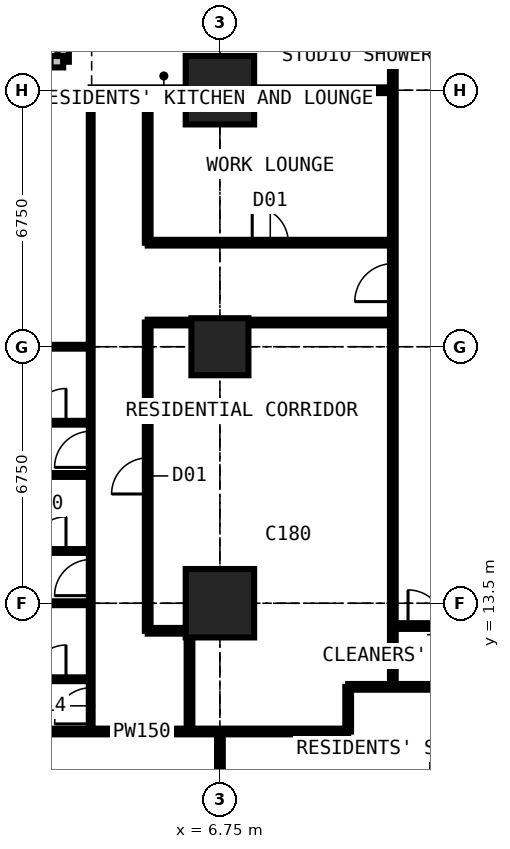
"""IFC4 building model, lengths in metres.
Left out: names, types, materials, properties, quantities, classifications, styles, units other than length and angle.
Written with IfcOpenShell. Run it as: python <this file> out.ifc"""

import sys

from ifc_helpers import new_model, si_unit, direction, frame, frame_2d, origin, origin_2d, place, context, subcontext, project, spatial, rectangle, extrude, element, fill, save


model = new_model("IFC4")
c1 = context("Model", 3, precision=1e-05, world=origin(), true_north=direction((0.0, 1.0)))
c2 = subcontext(c1, "Body", "Model", "MODEL_VIEW")
j1 = project(units=[si_unit("LENGTHUNIT", "METRE"), si_unit("PLANEANGLEUNIT", "RADIAN")], contexts=[c1])
p1 = place(None, origin())
s1 = spatial("IfcSite", under=j1, at=p1, CompositionType="ELEMENT")
p2 = place(p1, origin())
s2 = spatial("IfcBuilding", under=s1, at=p2, CompositionType="ELEMENT")
p3 = place(p2, frame((0.0, 0.0, 145.8)))
s3 = spatial("IfcBuildingStorey", under=s2, at=p3, CompositionType="ELEMENT", Elevation=145.8)
p4 = place(p3, frame((6.75, 13.5, 0.0), z_axis=(0.0, 0.0, 1.0), x_axis=(1.0, 0.0, 0.0)))
e1 = element("IfcColumn", 1, at=p4, inside=s3, PredefinedType="COLUMN", context=c2, shape_type="SweptSolid", body=[
    extrude(rectangle(XDim=1.8, YDim=1.8, at=origin_2d()), origin(), (0.0, 0.0, 1.0), 3.6),
])
p5 = place(p3, frame((6.75, 20.25, 0.0), z_axis=(0.0, 0.0, 1.0), x_axis=(1.0, 0.0, 0.0)))
e2 = element("IfcColumn", 2, at=p5, inside=s3, PredefinedType="COLUMN", context=c2, shape_type="SweptSolid", body=[
    extrude(rectangle(XDim=1.5, YDim=1.5, at=origin_2d()), origin(), (0.0, 0.0, 1.0), 3.6),
])
p6 = place(p3, frame((6.75, 27.0, 0.0), z_axis=(0.0, 0.0, 1.0), x_axis=(1.0, 0.0, 0.0)))
e3 = element("IfcColumn", 3, at=p6, inside=s3, PredefinedType="COLUMN", context=c2, shape_type="SweptSolid", body=[
    extrude(rectangle(XDim=1.8, YDim=1.8, at=origin_2d()), origin(), (0.0, 0.0, 1.0), 3.6),
])
p7 = place(p3, frame((2.625, 31.125, 0.0), z_axis=(0.0, 0.0, 1.0), x_axis=(0.0, -1.0, 0.0)))
e4 = element("IfcWall", 4, at=p7, inside=s3, PredefinedType="SOLIDWALL", context=c2, shape_type="SweptSolid", body=[
    extrude(rectangle(XDim=3.375, YDim=0.3, at=frame_2d((1.688, 0.0))), origin(), (0.0, 0.0, 1.0), 3.375),
])
p8 = place(p7, frame((0.788, 0.0, 0.6)))
e5 = element("IfcOpeningElement", 5, at=p8, cuts=e4, PredefinedType="OPENING", context=c2, shape_type="SweptSolid", body=[
    extrude(rectangle(XDim=1.8, YDim=2.1, at=frame_2d((0.9, 1.05))), frame((0.0, 0.16, 0.0), z_axis=(0.0, -1.0, 0.0), x_axis=(1.0, 0.0, 0.0)), (0.0, 0.0, 1.0), 0.32),
])
p9 = place(p3, frame((2.625, 27.75, 0.0), z_axis=(0.0, 0.0, 1.0), x_axis=(-1.0, 0.0, 0.0)))
e6 = element("IfcWall", 6, at=p9, inside=s3, PredefinedType="SOLIDWALL", context=c2, shape_type="SweptSolid", body=[
    extrude(rectangle(XDim=3.375, YDim=0.3, at=frame_2d((1.688, 0.0))), origin(), (0.0, 0.0, 1.0), 3.375),
])
p10 = place(p9, frame((0.292, 0.0, 0.9)))
e7 = element("IfcOpeningElement", 7, at=p10, cuts=e6, PredefinedType="OPENING", context=c2, shape_type="SweptSolid", body=[
    extrude(rectangle(XDim=1.2, YDim=1.8, at=frame_2d((0.6, 0.9))), frame((0.0, 0.16, 0.0), z_axis=(0.0, -1.0, 0.0), x_axis=(1.0, 0.0, 0.0)), (0.0, 0.0, 1.0), 0.32),
])
p11 = place(p3, frame((-0.734, 10.125, 0.0), z_axis=(0.0, 0.0, 1.0), x_axis=(1.0, 0.0, 0.0)))
e8 = element("IfcWall", 8, at=p11, inside=s3, PredefinedType="PARTITIONING", context=c2, shape_type="SweptSolid", body=[
    extrude(rectangle(XDim=10.859, YDim=0.15, at=frame_2d((5.429, 0.0))), origin(), (0.0, 0.0, 1.0), 3.375),
])
p12 = place(p3, frame((-0.734, 13.5, 0.0), z_axis=(0.0, 0.0, 1.0), x_axis=(1.0, 0.0, 0.0)))
e9 = element("IfcWall", 9, at=p12, inside=s3, PredefinedType="PARTITIONING", context=c2, shape_type="SweptSolid", body=[
    extrude(rectangle(XDim=4.084, YDim=0.1, at=frame_2d((2.042, 0.0))), origin(), (0.0, 0.0, 1.0), 2.61),
])
p13 = place(p3, frame((-0.734, 16.875, 0.0), z_axis=(0.0, 0.0, 1.0), x_axis=(1.0, 0.0, 0.0)))
e10 = element("IfcWall", 10, at=p13, inside=s3, PredefinedType="PARTITIONING", context=c2, shape_type="SweptSolid", body=[
    extrude(rectangle(XDim=4.084, YDim=0.1, at=frame_2d((2.042, 0.0))), origin(), (0.0, 0.0, 1.0), 3.375),
])
p14 = place(p3, frame((-0.734, 20.25, 0.0), z_axis=(0.0, 0.0, 1.0), x_axis=(1.0, 0.0, 0.0)))
e11 = element("IfcWall", 11, at=p14, inside=s3, PredefinedType="PARTITIONING", context=c2, shape_type="SweptSolid", body=[
    extrude(rectangle(XDim=4.084, YDim=0.1, at=frame_2d((2.042, 0.0))), origin(), (0.0, 0.0, 1.0), 2.61),
])
p15 = place(p3, frame((1.15, 11.5, 0.0), z_axis=(0.0, 0.0, 1.0), x_axis=(1.0, 0.0, 0.0)))
e12 = element("IfcWall", 12, at=p15, inside=s3, PredefinedType="PARTITIONING", context=c2, shape_type="SweptSolid", body=[
    extrude(rectangle(XDim=2.2, YDim=0.1, at=frame_2d((1.1, 0.0))), origin(), (0.0, 0.0, 1.0), 3.375),
])
p16 = place(p15, frame((0.65, 0.0, 0.0)))
e13 = element("IfcOpeningElement", 13, at=p16, cuts=e12, PredefinedType="OPENING", context=c2, shape_type="SweptSolid", body=[
    extrude(rectangle(XDim=0.9, YDim=2.2, at=frame_2d((0.45, 1.1))), frame((0.0, 0.06, 0.0), z_axis=(0.0, -1.0, 0.0), x_axis=(1.0, 0.0, 0.0)), (0.0, 0.0, 1.0), 0.12),
])
p17 = place(p3, frame((1.15, 14.875, 0.0), z_axis=(0.0, 0.0, 1.0), x_axis=(1.0, 0.0, 0.0)))
e14 = element("IfcWall", 14, at=p17, inside=s3, PredefinedType="PARTITIONING", context=c2, shape_type="SweptSolid", body=[
    extrude(rectangle(XDim=2.2, YDim=0.1, at=frame_2d((1.1, 0.0))), origin(), (0.0, 0.0, 1.0), 3.375),
])
p18 = place(p17, frame((0.65, 0.0, 0.0)))
e15 = element("IfcOpeningElement", 15, at=p18, cuts=e14, PredefinedType="OPENING", context=c2, shape_type="SweptSolid", body=[
    extrude(rectangle(XDim=0.9, YDim=2.2, at=frame_2d((0.45, 1.1))), frame((0.0, 0.06, 0.0), z_axis=(0.0, -1.0, 0.0), x_axis=(1.0, 0.0, 0.0)), (0.0, 0.0, 1.0), 0.12),
])
p19 = place(p3, frame((1.15, 18.25, 0.0), z_axis=(0.0, 0.0, 1.0), x_axis=(1.0, 0.0, 0.0)))
e16 = element("IfcWall", 16, at=p19, inside=s3, PredefinedType="PARTITIONING", context=c2, shape_type="SweptSolid", body=[
    extrude(rectangle(XDim=2.2, YDim=0.1, at=frame_2d((1.1, 0.0))), origin(), (0.0, 0.0, 1.0), 3.375),
])
p20 = place(p19, frame((0.65, 0.0, 0.0)))
e17 = element("IfcOpeningElement", 17, at=p20, cuts=e16, PredefinedType="OPENING", context=c2, shape_type="SweptSolid", body=[
    extrude(rectangle(XDim=0.9, YDim=2.2, at=frame_2d((0.45, 1.1))), frame((0.0, 0.06, 0.0), z_axis=(0.0, -1.0, 0.0), x_axis=(1.0, 0.0, 0.0)), (0.0, 0.0, 1.0), 0.12),
])
p21 = place(p3, frame((3.35, 10.125, 0.0), z_axis=(0.0, 0.0, 1.0), x_axis=(0.0, 1.0, 0.0)))
e18 = element("IfcWall", 18, at=p21, inside=s3, PredefinedType="PARTITIONING", context=c2, shape_type="SweptSolid", body=[
    extrude(rectangle(XDim=16.875, YDim=0.1, at=frame_2d((8.438, 0.0))), origin(), (0.0, 0.0, 1.0), 3.375),
])
p22 = place(p21, frame((0.2, 0.0, 0.0)))
e19 = element("IfcOpeningElement", 19, at=p22, cuts=e18, PredefinedType="OPENING", context=c2, shape_type="SweptSolid", body=[
    extrude(rectangle(XDim=0.95, YDim=2.2, at=frame_2d((0.475, 1.1))), frame((0.0, 0.06, 0.0), z_axis=(0.0, -1.0, 0.0), x_axis=(1.0, 0.0, 0.0)), (0.0, 0.0, 1.0), 0.12),
])
p23 = place(p21, frame((3.575, 0.0, 0.0)))
e20 = element("IfcOpeningElement", 20, at=p23, cuts=e18, PredefinedType="OPENING", context=c2, shape_type="SweptSolid", body=[
    extrude(rectangle(XDim=0.95, YDim=2.2, at=frame_2d((0.475, 1.1))), frame((0.0, 0.06, 0.0), z_axis=(0.0, -1.0, 0.0), x_axis=(1.0, 0.0, 0.0)), (0.0, 0.0, 1.0), 0.12),
])
p24 = place(p21, frame((6.95, 0.0, 0.0)))
e21 = element("IfcOpeningElement", 21, at=p24, cuts=e18, PredefinedType="OPENING", context=c2, shape_type="SweptSolid", body=[
    extrude(rectangle(XDim=0.95, YDim=2.2, at=frame_2d((0.475, 1.1))), frame((0.0, 0.06, 0.0), z_axis=(0.0, -1.0, 0.0), x_axis=(1.0, 0.0, 0.0)), (0.0, 0.0, 1.0), 0.12),
])
p25 = place(p3, frame((3.35, 27.0, 0.0), z_axis=(0.0, 0.0, 1.0), x_axis=(1.0, 0.0, 0.0)))
e22 = element("IfcWall", 22, at=p25, inside=s3, PredefinedType="PARTITIONING", context=c2, shape_type="SweptSolid", body=[
    extrude(rectangle(XDim=7.95, YDim=0.15, at=frame_2d((3.975, 0.0))), origin(), (0.0, 0.0, 1.0), 2.806),
])
p26 = place(p3, frame((4.85, 12.775, 0.0), z_axis=(0.0, 0.0, 1.0), x_axis=(0.0, 1.0, 0.0)))
e23 = element("IfcWall", 23, at=p26, inside=s3, PredefinedType="PARTITIONING", context=c2, shape_type="SweptSolid", body=[
    extrude(rectangle(XDim=8.113, YDim=0.15, at=frame_2d((4.056, 0.0))), origin(), (0.0, 0.0, 1.0), 3.375),
])
p27 = place(p26, frame((3.6, 0.0, 0.0)))
e24 = element("IfcOpeningElement", 24, at=p27, cuts=e23, PredefinedType="OPENING", context=c2, shape_type="SweptSolid", body=[
    extrude(rectangle(XDim=0.95, YDim=2.2, at=frame_2d((0.475, 1.1))), frame((0.0, 0.085, 0.0), z_axis=(0.0, -1.0, 0.0), x_axis=(1.0, 0.0, 0.0)), (0.0, 0.0, 1.0), 0.17),
])
p28 = place(p3, frame((4.85, 12.775, 0.0), z_axis=(0.0, 0.0, 1.0), x_axis=(1.0, 0.0, 0.0)))
e25 = element("IfcWall", 25, at=p28, inside=s3, PredefinedType="PARTITIONING", context=c2, shape_type="SweptSolid", body=[
    extrude(rectangle(XDim=1.1, YDim=0.15, at=frame_2d((0.55, 0.0))), origin(), (0.0, 0.0, 1.0), 3.375),
])
p29 = place(p3, frame((4.85, 20.887, 0.0), z_axis=(0.0, 0.0, 1.0), x_axis=(1.0, 0.0, 0.0)))
e26 = element("IfcWall", 26, at=p29, inside=s3, PredefinedType="PARTITIONING", context=c2, shape_type="SweptSolid", body=[
    extrude(rectangle(XDim=6.45, YDim=0.15, at=frame_2d((3.225, 0.0))), origin(), (0.0, 0.0, 1.0), 3.375),
])
p30 = place(p3, frame((4.85, 22.988, 0.0), z_axis=(0.0, 0.0, 1.0), x_axis=(0.0, 1.0, 0.0)))
e27 = element("IfcWall", 27, at=p30, inside=s3, PredefinedType="PARTITIONING", context=c2, shape_type="SweptSolid", body=[
    extrude(rectangle(XDim=4.012, YDim=0.15, at=frame_2d((2.006, 0.0))), origin(), (0.0, 0.0, 1.0), 3.375),
])
p31 = place(p3, frame((4.85, 22.988, 0.0), z_axis=(0.0, 0.0, 1.0), x_axis=(1.0, 0.0, 0.0)))
e28 = element("IfcWall", 28, at=p31, inside=s3, PredefinedType="PARTITIONING", context=c2, shape_type="SweptSolid", body=[
    extrude(rectangle(XDim=6.45, YDim=0.15, at=frame_2d((3.225, 0.0))), origin(), (0.0, 0.0, 1.0), 3.375),
])
p32 = place(p31, frame((2.75, 0.0, 0.0)))
e29 = element("IfcOpeningElement", 29, at=p32, cuts=e28, PredefinedType="OPENING", context=c2, shape_type="SweptSolid", body=[
    extrude(rectangle(XDim=0.95, YDim=2.2, at=frame_2d((0.475, 1.1))), frame((0.0, 0.085, 0.0), z_axis=(0.0, -1.0, 0.0), x_axis=(1.0, 0.0, 0.0)), (0.0, 0.0, 1.0), 0.17),
])
p33 = place(p3, frame((5.95, 10.125, 0.0), z_axis=(0.0, 0.0, 1.0), x_axis=(0.0, 1.0, 0.0)))
e30 = element("IfcWall", 30, at=p33, inside=s3, PredefinedType="PARTITIONING", context=c2, shape_type="SweptSolid", body=[
    extrude(rectangle(XDim=2.65, YDim=0.15, at=frame_2d((1.325, 0.0))), origin(), (0.0, 0.0, 1.0), 3.375),
])
p34 = place(p3, frame((6.75, 3.35, 0.0), z_axis=(0.0, 0.0, 1.0), x_axis=(0.0, 1.0, 0.0)))
e31 = element("IfcWall", 31, at=p34, inside=s3, PredefinedType="PARTITIONING", context=c2, shape_type="SweptSolid", body=[
    extrude(rectangle(XDim=6.775, YDim=0.15, at=frame_2d((3.387, 0.0))), origin(), (0.0, 0.0, 1.0), 2.877),
])
p35 = place(p3, frame((10.125, 10.125, 0.0), z_axis=(0.0, 0.0, 1.0), x_axis=(0.0, 1.0, 0.0)))
e32 = element("IfcWall", 32, at=p35, inside=s3, PredefinedType="PARTITIONING", context=c2, shape_type="SweptSolid", body=[
    extrude(rectangle(XDim=1.175, YDim=0.15, at=frame_2d((0.587, 0.0))), origin(), (0.0, 0.0, 1.0), 3.375),
])
p36 = place(p3, frame((10.125, 11.3, 0.0), z_axis=(0.0, 0.0, 1.0), x_axis=(1.0, 0.0, 0.0)))
e33 = element("IfcWall", 33, at=p36, inside=s3, PredefinedType="PARTITIONING", context=c2, shape_type="SweptSolid", body=[
    extrude(rectangle(XDim=20.25, YDim=0.15, at=frame_2d((10.125, 0.0))), origin(), (0.0, 0.0, 1.0), 3.375),
])
p37 = place(p36, frame((8.375, 0.0, 0.0)))
e34 = element("IfcOpeningElement", 34, at=p37, cuts=e33, PredefinedType="OPENING", context=c2, shape_type="SweptSolid", body=[
    extrude(rectangle(XDim=1.0, YDim=2.2, at=frame_2d((0.5, 1.1))), frame((0.0, 0.085, 0.0), z_axis=(0.0, -1.0, 0.0), x_axis=(1.0, 0.0, 0.0)), (0.0, 0.0, 1.0), 0.17),
])
p38 = place(p36, frame((10.975, 0.0, 0.0)))
e35 = element("IfcOpeningElement", 35, at=p38, cuts=e33, PredefinedType="OPENING", context=c2, shape_type="SweptSolid", body=[
    extrude(rectangle(XDim=1.0, YDim=2.2, at=frame_2d((0.5, 1.1))), frame((0.0, 0.085, 0.0), z_axis=(0.0, -1.0, 0.0), x_axis=(1.0, 0.0, 0.0)), (0.0, 0.0, 1.0), 0.17),
])
p39 = place(p36, frame((4.875, 0.0, 0.0)))
e36 = element("IfcOpeningElement", 36, at=p39, cuts=e33, PredefinedType="OPENING", context=c2, shape_type="SweptSolid", body=[
    extrude(rectangle(XDim=0.95, YDim=2.2, at=frame_2d((0.475, 1.1))), frame((0.0, 0.085, 0.0), z_axis=(0.0, -1.0, 0.0), x_axis=(1.0, 0.0, 0.0)), (0.0, 0.0, 1.0), 0.17),
])
p40 = place(p3, frame((11.3, 11.3, 0.0), z_axis=(0.0, 0.0, 1.0), x_axis=(0.0, 1.0, 0.0)))
e37 = element("IfcWall", 37, at=p40, inside=s3, PredefinedType="PARTITIONING", context=c2, shape_type="SweptSolid", body=[
    extrude(rectangle(XDim=19.3, YDim=0.15, at=frame_2d((9.65, 0.0))), origin(), (0.0, 0.0, 1.0), 3.375),
])
p41 = place(p40, frame((18.1, 0.0, 0.0)))
e38 = element("IfcOpeningElement", 38, at=p41, cuts=e37, PredefinedType="OPENING", context=c2, shape_type="SweptSolid", body=[
    extrude(rectangle(XDim=1.0, YDim=2.2, at=frame_2d((0.5, 1.1))), frame((0.0, 0.085, 0.0), z_axis=(0.0, -1.0, 0.0), x_axis=(1.0, 0.0, 0.0)), (0.0, 0.0, 1.0), 0.17),
])
p42 = place(p40, frame((10.137, 0.0, 0.0)))
e39 = element("IfcOpeningElement", 39, at=p42, cuts=e37, PredefinedType="OPENING", context=c2, shape_type="SweptSolid", body=[
    extrude(rectangle(XDim=1.0, YDim=2.2, at=frame_2d((0.5, 1.1))), frame((0.0, 0.085, 0.0), z_axis=(0.0, -1.0, 0.0), x_axis=(1.0, 0.0, 0.0)), (0.0, 0.0, 1.0), 0.17),
])
p43 = place(p3, frame((11.3, 12.9, 0.0), z_axis=(0.0, 0.0, 1.0), x_axis=(1.0, 0.0, 0.0)))
e40 = element("IfcWall", 40, at=p43, inside=s3, PredefinedType="PARTITIONING", context=c2, shape_type="SweptSolid", body=[
    extrude(rectangle(XDim=1.8, YDim=0.15, at=frame_2d((0.9, 0.0))), origin(), (0.0, 0.0, 1.0), 2.806),
])
p44 = place(p43, frame((0.4, 0.0, 0.0)))
e41 = element("IfcOpeningElement", 41, at=p44, cuts=e40, PredefinedType="OPENING", context=c2, shape_type="SweptSolid", body=[
    extrude(rectangle(XDim=0.95, YDim=2.2, at=frame_2d((0.475, 1.1))), frame((0.0, 0.085, 0.0), z_axis=(0.0, -1.0, 0.0), x_axis=(1.0, 0.0, 0.0)), (0.0, 0.0, 1.0), 0.17),
])
p45 = place(p44, origin())
e42 = element("IfcDoor", 42, at=p45, inside=s3, OperationType="SINGLE_SWING_LEFT", PredefinedType="DOOR", context=c2, shape_type="SweptSolid", body=[
    extrude(rectangle(XDim=0.95, YDim=2.2, at=frame_2d((0.475, 1.1))), frame((0.0, 0.025, 0.0), z_axis=(0.0, -1.0, 0.0), x_axis=(1.0, 0.0, 0.0)), (0.0, 0.0, 1.0), 0.05),
])
fill(e41, e42)
p46 = place(p22, origin())
e43 = element("IfcDoor", 43, at=p46, inside=s3, OperationType="SINGLE_SWING_LEFT", PredefinedType="DOOR", context=c2, shape_type="SweptSolid", body=[
    extrude(rectangle(XDim=0.95, YDim=2.2, at=frame_2d((0.475, 1.1))), frame((0.0, 0.025, 0.0), z_axis=(0.0, -1.0, 0.0), x_axis=(1.0, 0.0, 0.0)), (0.0, 0.0, 1.0), 0.05),
])
fill(e19, e43)
p47 = place(p16, origin())
e44 = element("IfcDoor", 44, at=p47, inside=s3, OperationType="SINGLE_SWING_RIGHT", PredefinedType="DOOR", context=c2, shape_type="SweptSolid", body=[
    extrude(rectangle(XDim=0.9, YDim=2.2, at=frame_2d((0.45, 1.1))), frame((0.0, 0.025, 0.0), z_axis=(0.0, -1.0, 0.0), x_axis=(1.0, 0.0, 0.0)), (0.0, 0.0, 1.0), 0.05),
])
fill(e13, e44)
p48 = place(p23, origin())
e45 = element("IfcDoor", 45, at=p48, inside=s3, OperationType="SINGLE_SWING_LEFT", PredefinedType="DOOR", context=c2, shape_type="SweptSolid", body=[
    extrude(rectangle(XDim=0.95, YDim=2.2, at=frame_2d((0.475, 1.1))), frame((0.0, 0.025, 0.0), z_axis=(0.0, -1.0, 0.0), x_axis=(1.0, 0.0, 0.0)), (0.0, 0.0, 1.0), 0.05),
])
fill(e20, e45)
p49 = place(p18, origin())
e46 = element("IfcDoor", 46, at=p49, inside=s3, OperationType="SINGLE_SWING_RIGHT", PredefinedType="DOOR", context=c2, shape_type="SweptSolid", body=[
    extrude(rectangle(XDim=0.9, YDim=2.2, at=frame_2d((0.45, 1.1))), frame((0.0, 0.025, 0.0), z_axis=(0.0, -1.0, 0.0), x_axis=(1.0, 0.0, 0.0)), (0.0, 0.0, 1.0), 0.05),
])
fill(e15, e46)
p50 = place(p24, origin())
e47 = element("IfcDoor", 47, at=p50, inside=s3, OperationType="SINGLE_SWING_LEFT", PredefinedType="DOOR", context=c2, shape_type="SweptSolid", body=[
    extrude(rectangle(XDim=0.95, YDim=2.2, at=frame_2d((0.475, 1.1))), frame((0.0, 0.025, 0.0), z_axis=(0.0, -1.0, 0.0), x_axis=(1.0, 0.0, 0.0)), (0.0, 0.0, 1.0), 0.05),
])
fill(e21, e47)
p51 = place(p20, origin())
e48 = element("IfcDoor", 48, at=p51, inside=s3, OperationType="SINGLE_SWING_RIGHT", PredefinedType="DOOR", context=c2, shape_type="SweptSolid", body=[
    extrude(rectangle(XDim=0.9, YDim=2.2, at=frame_2d((0.45, 1.1))), frame((0.0, 0.025, 0.0), z_axis=(0.0, -1.0, 0.0), x_axis=(1.0, 0.0, 0.0)), (0.0, 0.0, 1.0), 0.05),
])
fill(e17, e48)
p52 = place(p42, origin())
e49 = element("IfcDoor", 49, at=p52, inside=s3, OperationType="SINGLE_SWING_LEFT", PredefinedType="DOOR", context=c2, shape_type="SweptSolid", body=[
    extrude(rectangle(XDim=1.0, YDim=2.2, at=frame_2d((0.5, 1.1))), frame((0.0, 0.025, 0.0), z_axis=(0.0, -1.0, 0.0), x_axis=(1.0, 0.0, 0.0)), (0.0, 0.0, 1.0), 0.05),
])
fill(e39, e49)
p53 = place(p27, origin())
e50 = element("IfcDoor", 50, at=p53, inside=s3, OperationType="SINGLE_SWING_LEFT", PredefinedType="DOOR", context=c2, shape_type="SweptSolid", body=[
    extrude(rectangle(XDim=0.95, YDim=2.2, at=frame_2d((0.475, 1.1))), frame((0.0, 0.025, 0.0), z_axis=(0.0, -1.0, 0.0), x_axis=(1.0, 0.0, 0.0)), (0.0, 0.0, 1.0), 0.05),
])
fill(e24, e50)
p54 = place(p32, origin())
e51 = element("IfcDoor", 51, at=p54, inside=s3, OperationType="SINGLE_SWING_LEFT", PredefinedType="DOOR", context=c2, shape_type="SweptSolid", body=[
    extrude(rectangle(XDim=0.95, YDim=2.2, at=frame_2d((0.475, 1.1))), frame((0.0, 0.025, 0.0), z_axis=(0.0, -1.0, 0.0), x_axis=(1.0, 0.0, 0.0)), (0.0, 0.0, 1.0), 0.05),
])
fill(e29, e51)
save(model, sys.argv[1])
